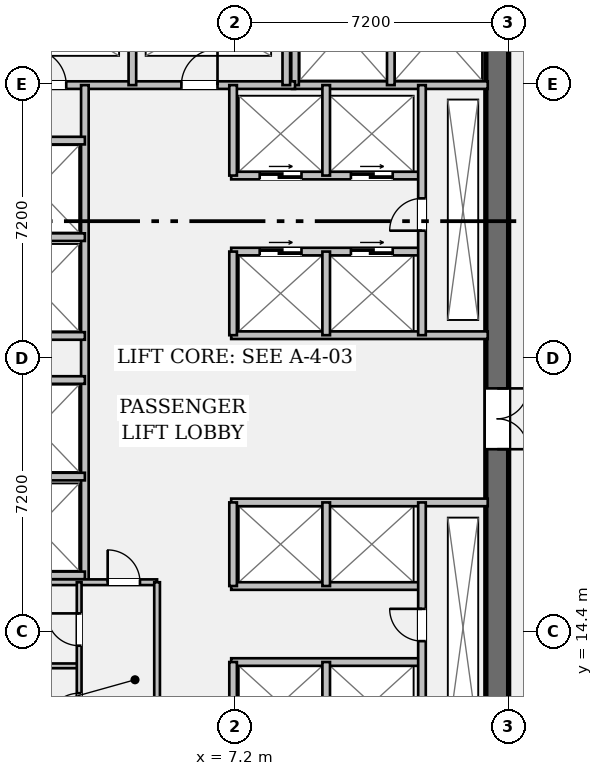
"""IFC4 building model, lengths in metres.
Left out: names, types, materials, properties, quantities, classifications, styles, units other than length and angle.
Written with IfcOpenShell. Run it as: python <this file> out.ifc"""

import sys

from ifc_helpers import new_model, si_unit, direction, frame, frame_2d, origin, place, context, subcontext, project, spatial, rectangle, extrude, element, fill, save


model = new_model("IFC4")
c1 = context("Model", 3, precision=1e-05, world=origin(), true_north=direction((0.0, 1.0)))
c2 = subcontext(c1, "Body", "Model", "MODEL_VIEW")
j1 = project(units=[si_unit("LENGTHUNIT", "METRE"), si_unit("PLANEANGLEUNIT", "RADIAN")], contexts=[c1])
p1 = place(None, origin())
s1 = spatial("IfcSite", under=j1, at=p1, CompositionType="ELEMENT")
p2 = place(p1, origin())
s2 = spatial("IfcBuilding", under=s1, at=p2, CompositionType="ELEMENT")
p3 = place(p2, frame((0.0, 0.0, 22.05)))
s3 = spatial("IfcBuildingStorey", under=s2, at=p3, CompositionType="ELEMENT", Elevation=22.05)
p4 = place(p3, frame((14.1, 35.4, 0.0), z_axis=(0.0, 0.0, 1.0), x_axis=(0.0, -1.0, 0.0)))
e1 = element("IfcWall", 1, at=p4, inside=s3, PredefinedType="SHEAR", context=c2, shape_type="SweptSolid", body=[
    extrude(rectangle(XDim=27.6, YDim=0.6, at=frame_2d((13.8, 0.0))), origin(), (0.0, 0.0, 1.0), 3.9),
])
p5 = place(p4, frame((1.3, 0.0, 0.0)))
e2 = element("IfcOpeningElement", 2, at=p5, cuts=e1, PredefinedType="OPENING", context=c2, shape_type="SweptSolid", body=[
    extrude(rectangle(XDim=1.2, YDim=2.15, at=frame_2d((0.6, 1.075))), frame((0.0, 0.312, 0.0), z_axis=(0.0, -1.0, 0.0), x_axis=(1.0, 0.0, 0.0)), (0.0, 0.0, 1.0), 0.624),
])
p6 = place(p4, frame((25.25, 0.0, 0.0)))
e3 = element("IfcOpeningElement", 3, at=p6, cuts=e1, PredefinedType="OPENING", context=c2, shape_type="SweptSolid", body=[
    extrude(rectangle(XDim=1.2, YDim=2.15, at=frame_2d((0.6, 1.075))), frame((0.0, 0.312, 0.0), z_axis=(0.0, -1.0, 0.0), x_axis=(1.0, 0.0, 0.0)), (0.0, 0.0, 1.0), 0.624),
])
p7 = place(p4, frame((14.6, 0.0, 0.0)))
e4 = element("IfcOpeningElement", 4, at=p7, cuts=e1, PredefinedType="OPENING", context=c2, shape_type="SweptSolid", body=[
    extrude(rectangle(XDim=1.6, YDim=2.2, at=frame_2d((0.8, 1.1))), frame((0.0, 0.312, 0.0), z_axis=(0.0, -1.0, 0.0), x_axis=(1.0, 0.0, 0.0)), (0.0, 0.0, 1.0), 0.624),
])
p8 = place(p3, frame((8.7, 28.78, 0.0), z_axis=(0.0, 0.0, 1.0), x_axis=(1.0, 0.0, 0.0)))
e5 = element("IfcWall", 5, at=p8, inside=s3, PredefinedType="PARTITIONING", context=c2, shape_type="SweptSolid", body=[
    extrude(rectangle(XDim=5.15, YDim=0.2, at=frame_2d((2.575, 0.0))), origin(), (0.0, 0.0, 1.0), 3.9),
])
for number, where, z_axis, x_axis in (
    (6, (8.78, 28.78, 0.0), (0.0, 0.0, 1.0), (0.0, 1.0, 0.0)),
    (7, (11.3, 28.78, 0.0), (0.0, 0.0, 1.0), (0.0, 1.0, 0.0)),
):
    element("IfcWall", number, at=place(p3, frame(where, z_axis=z_axis, x_axis=x_axis)), inside=s3, PredefinedType="PARTITIONING", context=c2, shape_type="SweptSolid", body=[
        extrude(rectangle(XDim=3.1, YDim=0.2, at=frame_2d((1.55, 0.0))), origin(), (0.0, 0.0, 1.0), 3.9),
    ])
p9 = place(p3, frame((0.6, 28.78, 0.0), z_axis=(0.0, 0.0, 1.0), x_axis=(1.0, 0.0, 0.0)))
e8 = element("IfcWall", 8, at=p9, inside=s3, PredefinedType="PARTITIONING", context=c2, shape_type="SweptSolid", body=[
    extrude(rectangle(XDim=8.18, YDim=0.2, at=frame_2d((4.09, 0.0))), origin(), (0.0, 0.0, 1.0), 3.9),
])
p10 = place(p9, frame((1.21, 0.0, 0.0)))
e9 = element("IfcOpeningElement", 9, at=p10, cuts=e8, PredefinedType="OPENING", context=c2, shape_type="SweptSolid", body=[
    extrude(rectangle(XDim=0.95, YDim=2.15, at=frame_2d((0.475, 1.075))), frame((0.0, 0.112, 0.0), z_axis=(0.0, -1.0, 0.0), x_axis=(1.0, 0.0, 0.0)), (0.0, 0.0, 1.0), 0.224),
])
p11 = place(p9, frame((5.19, 0.0, 0.0)))
e10 = element("IfcOpeningElement", 10, at=p11, cuts=e8, PredefinedType="OPENING", context=c2, shape_type="SweptSolid", body=[
    extrude(rectangle(XDim=0.95, YDim=2.15, at=frame_2d((0.475, 1.075))), frame((0.0, 0.112, 0.0), z_axis=(0.0, -1.0, 0.0), x_axis=(1.0, 0.0, 0.0)), (0.0, 0.0, 1.0), 0.224),
])
for number, where, z_axis, x_axis in (
    (11, (4.5, 28.78, 0.0), (0.0, 0.0, 1.0), (0.0, 1.0, 0.0)),
    (12, (8.55, 28.78, 0.0), (0.0, 0.0, 1.0), (0.0, 1.0, 0.0)),
):
    element("IfcWall", number, at=place(p3, frame(where, z_axis=z_axis, x_axis=x_axis)), inside=s3, PredefinedType="PARTITIONING", context=c2, shape_type="SweptSolid", body=[
        extrude(rectangle(XDim=2.94, YDim=0.2, at=frame_2d((1.47, 0.0))), origin(), (0.0, 0.0, 1.0), 3.9),
    ])
p12 = place(p3, frame((3.25, 15.7, 0.0), z_axis=(0.0, 0.0, 1.0), x_axis=(0.0, 1.0, 0.0)))
e13 = element("IfcWall", 13, at=p12, inside=s3, PredefinedType="PARTITIONING", context=c2, shape_type="SweptSolid", body=[
    extrude(rectangle(XDim=13.08, YDim=0.2, at=frame_2d((6.54, 0.0))), origin(), (0.0, 0.0, 1.0), 3.9),
])
for number, where, z_axis, x_axis in (
    (14, (0.6, 15.88, 0.0), (0.0, 0.0, 1.0), (1.0, 0.0, 0.0)),
    (15, (0.6, 18.48, 0.0), (0.0, 0.0, 1.0), (1.0, 0.0, 0.0)),
    (16, (0.6, 22.18, 0.0), (0.0, 0.0, 1.0), (1.0, 0.0, 0.0)),
    (17, (0.6, 24.78, 0.0), (0.0, 0.0, 1.0), (1.0, 0.0, 0.0)),
    (18, (0.6, 21.02, 0.0), (0.0, 0.0, 1.0), (1.0, 0.0, 0.0)),
    (19, (0.6, 27.32, 0.0), (0.0, 0.0, 1.0), (1.0, 0.0, 0.0)),
):
    element("IfcWall", number, at=place(p3, frame(where, z_axis=z_axis, x_axis=x_axis)), inside=s3, PredefinedType="PARTITIONING", context=c2, shape_type="SweptSolid", body=[
        extrude(rectangle(XDim=2.65, YDim=0.2, at=frame_2d((1.325, 0.0))), origin(), (0.0, 0.0, 1.0), 3.9),
    ])
p13 = place(p3, frame((7.1, 22.2, 0.0), z_axis=(0.0, 0.0, 1.0), x_axis=(1.0, 0.0, 0.0)))
e20 = element("IfcWall", 20, at=p13, inside=s3, PredefinedType="PARTITIONING", context=c2, shape_type="SweptSolid", body=[
    extrude(rectangle(XDim=6.75, YDim=0.2, at=frame_2d((3.375, 0.0))), origin(), (0.0, 0.0, 1.0), 3.9),
])
p14 = place(p3, frame((7.1, 24.4, 0.0), z_axis=(0.0, 0.0, 1.0), x_axis=(1.0, 0.0, 0.0)))
e21 = element("IfcWall", 21, at=p14, inside=s3, PredefinedType="PARTITIONING", context=c2, shape_type="SweptSolid", body=[
    extrude(rectangle(XDim=5.02, YDim=0.2, at=frame_2d((2.51, 0.0))), origin(), (0.0, 0.0, 1.0), 3.9),
])
p15 = place(p14, frame((0.75, 0.0, 0.0)))
e22 = element("IfcOpeningElement", 22, at=p15, cuts=e21, PredefinedType="OPENING", context=c2, shape_type="SweptSolid", body=[
    extrude(rectangle(XDim=1.1, YDim=2.2, at=frame_2d((0.55, 1.1))), frame((0.0, 0.112, 0.0), z_axis=(0.0, -1.0, 0.0), x_axis=(1.0, 0.0, 0.0)), (0.0, 0.0, 1.0), 0.224),
])
p16 = place(p14, frame((3.15, 0.0, 0.0)))
e23 = element("IfcOpeningElement", 23, at=p16, cuts=e21, PredefinedType="OPENING", context=c2, shape_type="SweptSolid", body=[
    extrude(rectangle(XDim=1.1, YDim=2.2, at=frame_2d((0.55, 1.1))), frame((0.0, 0.112, 0.0), z_axis=(0.0, -1.0, 0.0), x_axis=(1.0, 0.0, 0.0)), (0.0, 0.0, 1.0), 0.224),
])
p17 = place(p3, frame((7.1, 26.4, 0.0), z_axis=(0.0, 0.0, 1.0), x_axis=(1.0, 0.0, 0.0)))
e24 = element("IfcWall", 24, at=p17, inside=s3, PredefinedType="PARTITIONING", context=c2, shape_type="SweptSolid", body=[
    extrude(rectangle(XDim=5.02, YDim=0.2, at=frame_2d((2.51, 0.0))), origin(), (0.0, 0.0, 1.0), 3.9),
])
p18 = place(p17, frame((0.75, 0.0, 0.0)))
e25 = element("IfcOpeningElement", 25, at=p18, cuts=e24, PredefinedType="OPENING", context=c2, shape_type="SweptSolid", body=[
    extrude(rectangle(XDim=1.1, YDim=2.2, at=frame_2d((0.55, 1.1))), frame((0.0, 0.112, 0.0), z_axis=(0.0, -1.0, 0.0), x_axis=(1.0, 0.0, 0.0)), (0.0, 0.0, 1.0), 0.224),
])
p19 = place(p17, frame((3.15, 0.0, 0.0)))
e26 = element("IfcOpeningElement", 26, at=p19, cuts=e24, PredefinedType="OPENING", context=c2, shape_type="SweptSolid", body=[
    extrude(rectangle(XDim=1.1, YDim=2.2, at=frame_2d((0.55, 1.1))), frame((0.0, 0.112, 0.0), z_axis=(0.0, -1.0, 0.0), x_axis=(1.0, 0.0, 0.0)), (0.0, 0.0, 1.0), 0.224),
])
p20 = place(p3, frame((7.15, 22.2, 0.0), z_axis=(0.0, 0.0, 1.0), x_axis=(0.0, 1.0, 0.0)))
e27 = element("IfcWall", 27, at=p20, inside=s3, PredefinedType="PARTITIONING", context=c2, shape_type="SweptSolid", body=[
    extrude(rectangle(XDim=2.2, YDim=0.2, at=frame_2d((1.1, 0.0))), origin(), (0.0, 0.0, 1.0), 3.9),
])
p21 = place(p3, frame((7.15, 26.4, 0.0), z_axis=(0.0, 0.0, 1.0), x_axis=(0.0, 1.0, 0.0)))
e28 = element("IfcWall", 28, at=p21, inside=s3, PredefinedType="PARTITIONING", context=c2, shape_type="SweptSolid", body=[
    extrude(rectangle(XDim=2.38, YDim=0.2, at=frame_2d((1.19, 0.0))), origin(), (0.0, 0.0, 1.0), 3.9),
])
p22 = place(p3, frame((9.6, 22.2, 0.0), z_axis=(0.0, 0.0, 1.0), x_axis=(0.0, 1.0, 0.0)))
e29 = element("IfcWall", 29, at=p22, inside=s3, PredefinedType="PARTITIONING", context=c2, shape_type="SweptSolid", body=[
    extrude(rectangle(XDim=2.2, YDim=0.2, at=frame_2d((1.1, 0.0))), origin(), (0.0, 0.0, 1.0), 3.9),
])
p23 = place(p3, frame((9.6, 26.4, 0.0), z_axis=(0.0, 0.0, 1.0), x_axis=(0.0, 1.0, 0.0)))
e30 = element("IfcWall", 30, at=p23, inside=s3, PredefinedType="PARTITIONING", context=c2, shape_type="SweptSolid", body=[
    extrude(rectangle(XDim=2.38, YDim=0.2, at=frame_2d((1.19, 0.0))), origin(), (0.0, 0.0, 1.0), 3.9),
])
p24 = place(p3, frame((12.12, 22.2, 0.0), z_axis=(0.0, 0.0, 1.0), x_axis=(0.0, 1.0, 0.0)))
e31 = element("IfcWall", 31, at=p24, inside=s3, PredefinedType="PARTITIONING", context=c2, shape_type="SweptSolid", body=[
    extrude(rectangle(XDim=6.58, YDim=0.2, at=frame_2d((3.29, 0.0))), origin(), (0.0, 0.0, 1.0), 3.9),
])
p25 = place(p24, frame((2.75, 0.0, 0.0)))
e32 = element("IfcOpeningElement", 32, at=p25, cuts=e31, PredefinedType="OPENING", context=c2, shape_type="SweptSolid", body=[
    extrude(rectangle(XDim=0.85, YDim=2.15, at=frame_2d((0.425, 1.075))), frame((0.0, 0.112, 0.0), z_axis=(0.0, -1.0, 0.0), x_axis=(1.0, 0.0, 0.0)), (0.0, 0.0, 1.0), 0.224),
])
p26 = place(p3, frame((7.1, 17.8, 0.0), z_axis=(0.0, 0.0, 1.0), x_axis=(1.0, 0.0, 0.0)))
e33 = element("IfcWall", 33, at=p26, inside=s3, PredefinedType="PARTITIONING", context=c2, shape_type="SweptSolid", body=[
    extrude(rectangle(XDim=6.75, YDim=0.2, at=frame_2d((3.375, 0.0))), origin(), (0.0, 0.0, 1.0), 3.9),
])
for number, where, z_axis, x_axis in (
    (34, (7.1, 15.6, 0.0), (0.0, 0.0, 1.0), (1.0, 0.0, 0.0)),
    (35, (7.1, 13.6, 0.0), (0.0, 0.0, 1.0), (1.0, 0.0, 0.0)),
):
    element("IfcWall", number, at=place(p3, frame(where, z_axis=z_axis, x_axis=x_axis)), inside=s3, PredefinedType="PARTITIONING", context=c2, shape_type="SweptSolid", body=[
        extrude(rectangle(XDim=5.02, YDim=0.2, at=frame_2d((2.51, 0.0))), origin(), (0.0, 0.0, 1.0), 3.9),
    ])
p27 = place(p3, frame((7.15, 15.6, 0.0), z_axis=(0.0, 0.0, 1.0), x_axis=(0.0, 1.0, 0.0)))
e36 = element("IfcWall", 36, at=p27, inside=s3, PredefinedType="PARTITIONING", context=c2, shape_type="SweptSolid", body=[
    extrude(rectangle(XDim=2.2, YDim=0.2, at=frame_2d((1.1, 0.0))), origin(), (0.0, 0.0, 1.0), 3.9),
])
p28 = place(p3, frame((7.15, 11.2, 0.0), z_axis=(0.0, 0.0, 1.0), x_axis=(0.0, 1.0, 0.0)))
e37 = element("IfcWall", 37, at=p28, inside=s3, PredefinedType="PARTITIONING", context=c2, shape_type="SweptSolid", body=[
    extrude(rectangle(XDim=2.4, YDim=0.2, at=frame_2d((1.2, 0.0))), origin(), (0.0, 0.0, 1.0), 3.9),
])
p29 = place(p3, frame((9.6, 15.6, 0.0), z_axis=(0.0, 0.0, 1.0), x_axis=(0.0, 1.0, 0.0)))
e38 = element("IfcWall", 38, at=p29, inside=s3, PredefinedType="PARTITIONING", context=c2, shape_type="SweptSolid", body=[
    extrude(rectangle(XDim=2.2, YDim=0.2, at=frame_2d((1.1, 0.0))), origin(), (0.0, 0.0, 1.0), 3.9),
])
p30 = place(p3, frame((9.6, 11.2, 0.0), z_axis=(0.0, 0.0, 1.0), x_axis=(0.0, 1.0, 0.0)))
e39 = element("IfcWall", 39, at=p30, inside=s3, PredefinedType="PARTITIONING", context=c2, shape_type="SweptSolid", body=[
    extrude(rectangle(XDim=2.4, YDim=0.2, at=frame_2d((1.2, 0.0))), origin(), (0.0, 0.0, 1.0), 3.9),
])
p31 = place(p3, frame((12.12, 11.2, 0.0), z_axis=(0.0, 0.0, 1.0), x_axis=(0.0, 1.0, 0.0)))
e40 = element("IfcWall", 40, at=p31, inside=s3, PredefinedType="PARTITIONING", context=c2, shape_type="SweptSolid", body=[
    extrude(rectangle(XDim=6.6, YDim=0.2, at=frame_2d((3.3, 0.0))), origin(), (0.0, 0.0, 1.0), 3.9),
])
p32 = place(p31, frame((2.95, 0.0, 0.0)))
e41 = element("IfcOpeningElement", 41, at=p32, cuts=e40, PredefinedType="OPENING", context=c2, shape_type="SweptSolid", body=[
    extrude(rectangle(XDim=0.85, YDim=2.15, at=frame_2d((0.425, 1.075))), frame((0.0, 0.112, 0.0), z_axis=(0.0, -1.0, 0.0), x_axis=(1.0, 0.0, 0.0)), (0.0, 0.0, 1.0), 0.224),
])
p33 = place(p3, frame((0.6, 15.7, 0.0), z_axis=(0.0, 0.0, 1.0), x_axis=(1.0, 0.0, 0.0)))
e42 = element("IfcWall", 42, at=p33, inside=s3, PredefinedType="PARTITIONING", context=c2, shape_type="SweptSolid", body=[
    extrude(rectangle(XDim=4.55, YDim=0.15, at=frame_2d((2.275, 0.0))), origin(), (0.0, 0.0, 1.0), 3.9),
])
p34 = place(p33, frame((3.25, 0.0, 0.0)))
e43 = element("IfcOpeningElement", 43, at=p34, cuts=e42, PredefinedType="OPENING", context=c2, shape_type="SweptSolid", body=[
    extrude(rectangle(XDim=0.85, YDim=2.15, at=frame_2d((0.425, 1.075))), frame((0.0, 0.087, 0.0), z_axis=(0.0, -1.0, 0.0), x_axis=(1.0, 0.0, 0.0)), (0.0, 0.0, 1.0), 0.174),
])
p35 = place(p3, frame((5.15, 11.28, 0.0), z_axis=(0.0, 0.0, 1.0), x_axis=(0.0, 1.0, 0.0)))
e44 = element("IfcWall", 44, at=p35, inside=s3, PredefinedType="PARTITIONING", context=c2, shape_type="SweptSolid", body=[
    extrude(rectangle(XDim=4.42, YDim=0.15, at=frame_2d((2.21, 0.0))), origin(), (0.0, 0.0, 1.0), 3.9),
])
p36 = place(p3, frame((0.6, 13.5, 0.0), z_axis=(0.0, 0.0, 1.0), x_axis=(1.0, 0.0, 0.0)))
e45 = element("IfcWall", 45, at=p36, inside=s3, PredefinedType="PARTITIONING", context=c2, shape_type="SweptSolid", body=[
    extrude(rectangle(XDim=2.5, YDim=0.125, at=frame_2d((1.25, 0.0))), origin(), (0.0, 0.0, 1.0), 3.9),
])
p37 = place(p3, frame((3.1, 11.28, 0.0), z_axis=(0.0, 0.0, 1.0), x_axis=(0.0, 1.0, 0.0)))
e46 = element("IfcWall", 46, at=p37, inside=s3, PredefinedType="PARTITIONING", context=c2, shape_type="SweptSolid", body=[
    extrude(rectangle(XDim=4.42, YDim=0.125, at=frame_2d((2.21, 0.0))), origin(), (0.0, 0.0, 1.0), 3.9),
])
p38 = place(p37, frame((0.65, 0.0, 0.0)))
e47 = element("IfcOpeningElement", 47, at=p38, cuts=e46, PredefinedType="OPENING", context=c2, shape_type="SweptSolid", body=[
    extrude(rectangle(XDim=0.85, YDim=2.15, at=frame_2d((0.425, 1.075))), frame((0.0, 0.074, 0.0), z_axis=(0.0, -1.0, 0.0), x_axis=(1.0, 0.0, 0.0)), (0.0, 0.0, 1.0), 0.149),
])
p39 = place(p37, frame((2.75, 0.0, 0.0)))
e48 = element("IfcOpeningElement", 48, at=p39, cuts=e46, PredefinedType="OPENING", context=c2, shape_type="SweptSolid", body=[
    extrude(rectangle(XDim=0.85, YDim=2.15, at=frame_2d((0.425, 1.075))), frame((0.0, 0.074, 0.0), z_axis=(0.0, -1.0, 0.0), x_axis=(1.0, 0.0, 0.0)), (0.0, 0.0, 1.0), 0.149),
])
p40 = place(p10, origin())
e49 = element("IfcDoor", 49, at=p40, inside=s3, OperationType="SINGLE_SWING_LEFT", PredefinedType="DOOR", context=c2, shape_type="SweptSolid", body=[
    extrude(rectangle(XDim=0.95, YDim=2.15, at=frame_2d((0.475, 1.075))), frame((0.0, 0.025, 0.0), z_axis=(0.0, -1.0, 0.0), x_axis=(1.0, 0.0, 0.0)), (0.0, 0.0, 1.0), 0.05),
])
fill(e9, e49)
p41 = place(p11, origin())
e50 = element("IfcDoor", 50, at=p41, inside=s3, OperationType="SINGLE_SWING_RIGHT", PredefinedType="DOOR", context=c2, shape_type="SweptSolid", body=[
    extrude(rectangle(XDim=0.95, YDim=2.15, at=frame_2d((0.475, 1.075))), frame((0.0, 0.025, 0.0), z_axis=(0.0, -1.0, 0.0), x_axis=(1.0, 0.0, 0.0)), (0.0, 0.0, 1.0), 0.05),
])
fill(e10, e50)
p42 = place(p7, origin())
e51 = element("IfcDoor", 51, at=p42, inside=s3, OperationType="DOUBLE_DOOR_SINGLE_SWING", PredefinedType="DOOR", context=c2, shape_type="SweptSolid", body=[
    extrude(rectangle(XDim=1.6, YDim=2.2, at=frame_2d((0.8, 1.1))), frame((0.0, 0.025, 0.0), z_axis=(0.0, -1.0, 0.0), x_axis=(1.0, 0.0, 0.0)), (0.0, 0.0, 1.0), 0.05),
])
fill(e4, e51)
p43 = place(p25, origin())
e52 = element("IfcDoor", 52, at=p43, inside=s3, OperationType="SINGLE_SWING_LEFT", PredefinedType="DOOR", context=c2, shape_type="SweptSolid", body=[
    extrude(rectangle(XDim=0.85, YDim=2.15, at=frame_2d((0.425, 1.075))), frame((0.0, 0.025, 0.0), z_axis=(0.0, -1.0, 0.0), x_axis=(1.0, 0.0, 0.0)), (0.0, 0.0, 1.0), 0.05),
])
fill(e32, e52)
p44 = place(p15, origin())
e53 = element("IfcDoor", 53, at=p44, inside=s3, OperationType="DOUBLE_DOOR_SLIDING", PredefinedType="DOOR", context=c2, shape_type="SweptSolid", body=[
    extrude(rectangle(XDim=1.1, YDim=2.2, at=frame_2d((0.55, 1.1))), frame((0.0, 0.025, 0.0), z_axis=(0.0, -1.0, 0.0), x_axis=(1.0, 0.0, 0.0)), (0.0, 0.0, 1.0), 0.05),
])
fill(e22, e53)
p45 = place(p16, origin())
e54 = element("IfcDoor", 54, at=p45, inside=s3, OperationType="DOUBLE_DOOR_SLIDING", PredefinedType="DOOR", context=c2, shape_type="SweptSolid", body=[
    extrude(rectangle(XDim=1.1, YDim=2.2, at=frame_2d((0.55, 1.1))), frame((0.0, 0.025, 0.0), z_axis=(0.0, -1.0, 0.0), x_axis=(1.0, 0.0, 0.0)), (0.0, 0.0, 1.0), 0.05),
])
fill(e23, e54)
p46 = place(p18, origin())
e55 = element("IfcDoor", 55, at=p46, inside=s3, OperationType="DOUBLE_DOOR_SLIDING", PredefinedType="DOOR", context=c2, shape_type="SweptSolid", body=[
    extrude(rectangle(XDim=1.1, YDim=2.2, at=frame_2d((0.55, 1.1))), frame((0.0, 0.025, 0.0), z_axis=(0.0, -1.0, 0.0), x_axis=(1.0, 0.0, 0.0)), (0.0, 0.0, 1.0), 0.05),
])
fill(e25, e55)
p47 = place(p19, origin())
e56 = element("IfcDoor", 56, at=p47, inside=s3, OperationType="DOUBLE_DOOR_SLIDING", PredefinedType="DOOR", context=c2, shape_type="SweptSolid", body=[
    extrude(rectangle(XDim=1.1, YDim=2.2, at=frame_2d((0.55, 1.1))), frame((0.0, 0.025, 0.0), z_axis=(0.0, -1.0, 0.0), x_axis=(1.0, 0.0, 0.0)), (0.0, 0.0, 1.0), 0.05),
])
fill(e26, e56)
p48 = place(p32, origin())
e57 = element("IfcDoor", 57, at=p48, inside=s3, OperationType="SINGLE_SWING_RIGHT", PredefinedType="DOOR", context=c2, shape_type="SweptSolid", body=[
    extrude(rectangle(XDim=0.85, YDim=2.15, at=frame_2d((0.425, 1.075))), frame((0.0, 0.025, 0.0), z_axis=(0.0, -1.0, 0.0), x_axis=(1.0, 0.0, 0.0)), (0.0, 0.0, 1.0), 0.05),
])
fill(e41, e57)
p49 = place(p34, origin())
e58 = element("IfcDoor", 58, at=p49, inside=s3, OperationType="SINGLE_SWING_LEFT", PredefinedType="DOOR", context=c2, shape_type="SweptSolid", body=[
    extrude(rectangle(XDim=0.85, YDim=2.15, at=frame_2d((0.425, 1.075))), frame((0.0, 0.025, 0.0), z_axis=(0.0, -1.0, 0.0), x_axis=(1.0, 0.0, 0.0)), (0.0, 0.0, 1.0), 0.05),
])
fill(e43, e58)
p50 = place(p38, origin())
e59 = element("IfcDoor", 59, at=p50, inside=s3, OperationType="SINGLE_SWING_LEFT", PredefinedType="DOOR", context=c2, shape_type="SweptSolid", body=[
    extrude(rectangle(XDim=0.85, YDim=2.15, at=frame_2d((0.425, 1.075))), frame((0.0, 0.025, 0.0), z_axis=(0.0, -1.0, 0.0), x_axis=(1.0, 0.0, 0.0)), (0.0, 0.0, 1.0), 0.05),
])
fill(e47, e59)
p51 = place(p39, origin())
e60 = element("IfcDoor", 60, at=p51, inside=s3, OperationType="SINGLE_SWING_RIGHT", PredefinedType="DOOR", context=c2, shape_type="SweptSolid", body=[
    extrude(rectangle(XDim=0.85, YDim=2.15, at=frame_2d((0.425, 1.075))), frame((0.0, 0.025, 0.0), z_axis=(0.0, -1.0, 0.0), x_axis=(1.0, 0.0, 0.0)), (0.0, 0.0, 1.0), 0.05),
])
fill(e48, e60)
save(model, sys.argv[1])
